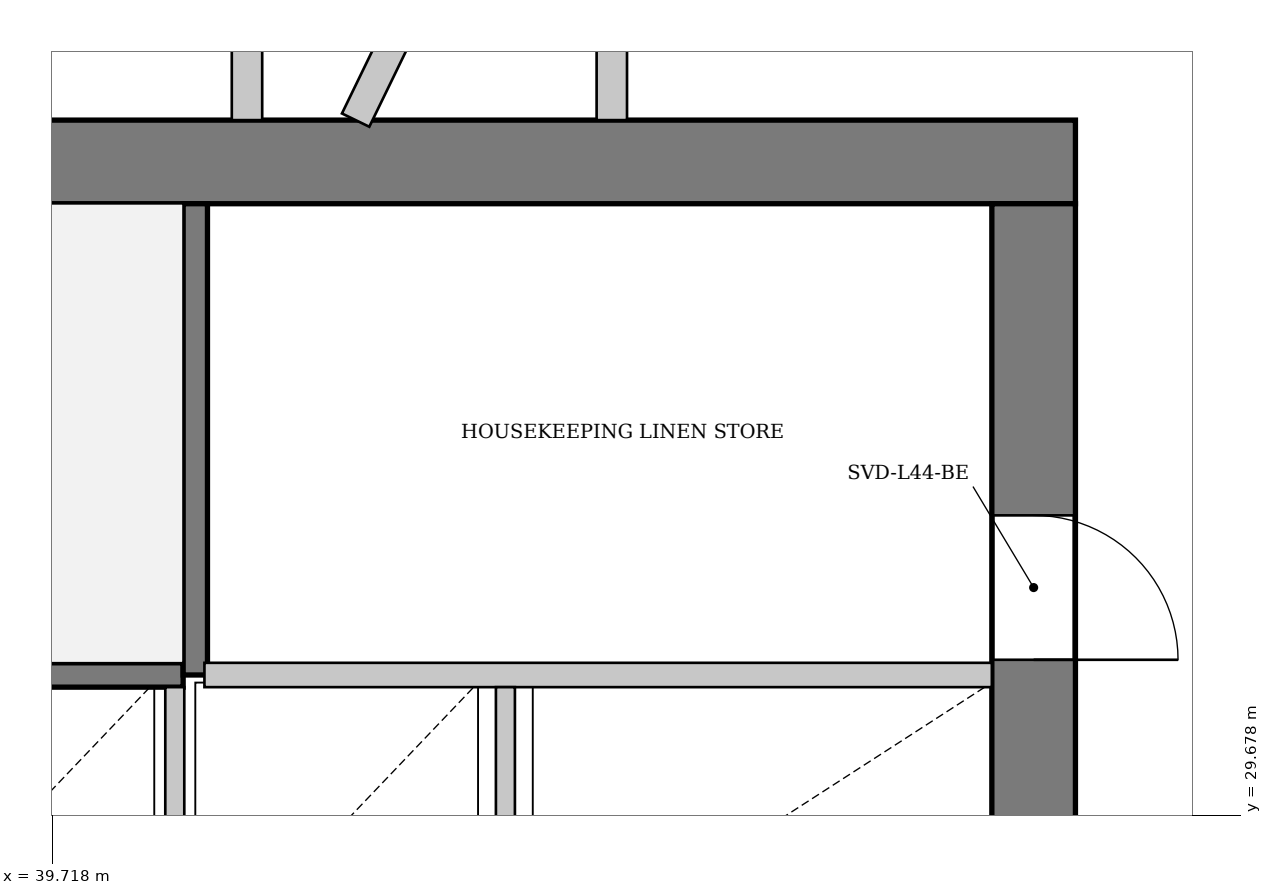
"""IFC4 building model, lengths in metres.
Left out: names, types, materials, properties, quantities, classifications, styles, units other than length and angle.
Written with IfcOpenShell. Run it as: python <this file> out.ifc"""

import sys

from ifc_helpers import new_model, si_unit, direction, frame, frame_2d, origin, place, context, subcontext, project, spatial, rectangle, extrude, source, transform, mapped, element, fill, save


model = new_model("IFC4")
c1 = context("Model", 3, precision=1e-05, world=origin(), true_north=direction((0.0, 1.0)))
c2 = subcontext(c1, "Body", "Model", "MODEL_VIEW")
j1 = project(units=[si_unit("LENGTHUNIT", "METRE"), si_unit("PLANEANGLEUNIT", "RADIAN")], contexts=[c1])
p1 = place(None, origin())
s1 = spatial("IfcSite", under=j1, at=p1, CompositionType="ELEMENT")
p2 = place(p1, origin())
s2 = spatial("IfcBuilding", under=s1, at=p2, CompositionType="ELEMENT")
p3 = place(p2, frame((0.0, 0.0, 167.9)))
s3 = spatial("IfcBuildingStorey", under=s2, at=p3, CompositionType="ELEMENT", Elevation=167.9)
p4 = place(p3, frame((29.55, 33.975, 0.0), z_axis=(0.0, 0.0, 1.0), x_axis=(1.0, 0.0, 0.0)))
e1 = element("IfcWall", 1, at=p4, inside=s3, PredefinedType="SHEAR", context=c2, shape_type="SweptSolid", body=[
    extrude(rectangle(XDim=16.9, YDim=0.55, at=frame_2d((8.45, 0.0))), origin(), (0.0, 0.0, 1.0), 3.33),
])
p5 = place(p4, frame((1.55, 0.0, 0.0)))
e2 = element("IfcOpeningElement", 2, at=p5, cuts=e1, PredefinedType="OPENING", context=c2, shape_type="SweptSolid", body=[
    extrude(rectangle(XDim=0.95, YDim=2.1, at=frame_2d((0.475, 1.05))), frame((0.0, 0.285, 0.0), z_axis=(0.0, -1.0, 0.0), x_axis=(1.0, 0.0, 0.0)), (0.0, 0.0, 1.0), 0.57),
])
p6 = place(p4, frame((3.93, 0.0, 0.0)))
e3 = element("IfcOpeningElement", 3, at=p6, cuts=e1, PredefinedType="OPENING", context=c2, shape_type="SweptSolid", body=[
    extrude(rectangle(XDim=1.32, YDim=2.2, at=frame_2d((0.66, 1.1))), frame((0.0, 0.285, 0.0), z_axis=(0.0, -1.0, 0.0), x_axis=(1.0, 0.0, 0.0)), (0.0, 0.0, 1.0), 0.57),
])
p7 = place(p3, frame((46.175, 33.7, 0.0), z_axis=(0.0, 0.0, 1.0), x_axis=(0.0, -1.0, 0.0)))
e4 = element("IfcWall", 4, at=p7, inside=s3, PredefinedType="SHEAR", context=c2, shape_type="SweptSolid", body=[
    extrude(rectangle(XDim=14.2, YDim=0.55, at=frame_2d((7.1, 0.0))), origin(), (0.0, 0.0, 1.0), 3.33),
])
p8 = place(p7, frame((5.18, 0.0, 0.0)))
e5 = element("IfcOpeningElement", 5, at=p8, cuts=e4, PredefinedType="OPENING", context=c2, shape_type="SweptSolid", body=[
    extrude(rectangle(XDim=1.6, YDim=2.2, at=frame_2d((0.8, 1.1))), frame((0.0, 0.285, 0.0), z_axis=(0.0, -1.0, 0.0), x_axis=(1.0, 0.0, 0.0)), (0.0, 0.0, 1.0), 0.57),
])
p9 = place(p7, frame((2.05, 0.0, 0.0)))
e6 = element("IfcOpeningElement", 6, at=p9, cuts=e4, PredefinedType="OPENING", context=c2, shape_type="SweptSolid", body=[
    extrude(rectangle(XDim=0.95, YDim=2.1, at=frame_2d((0.475, 1.05))), frame((0.0, 0.285, 0.0), z_axis=(0.0, -1.0, 0.0), x_axis=(1.0, 0.0, 0.0)), (0.0, 0.0, 1.0), 0.57),
])
p10 = place(p3, frame((33.28, 30.6, 0.0), z_axis=(0.0, 0.0, 1.0), x_axis=(1.0, 0.0, 0.0)))
e7 = element("IfcWall", 7, at=p10, inside=s3, PredefinedType="PARTITIONING", context=c2, shape_type="SweptSolid", body=[
    extrude(rectangle(XDim=7.3, YDim=0.16, at=frame_2d((3.65, 0.0))), origin(), (0.0, 0.0, 1.0), 3.33),
])
p11 = place(p3, frame((40.66, 30.6, 0.0), z_axis=(0.0, 0.0, 1.0), x_axis=(0.0, 1.0, 0.0)))
e8 = element("IfcWall", 8, at=p11, inside=s3, PredefinedType="PARTITIONING", context=c2, shape_type="SweptSolid", body=[
    extrude(rectangle(XDim=3.1, YDim=0.16, at=frame_2d((1.55, 0.0))), origin(), (0.0, 0.0, 1.0), 3.33),
])
p12 = place(p3, frame((40.72, 30.6, 0.0), z_axis=(0.0, 0.0, 1.0), x_axis=(1.0, 0.0, 0.0)))
e9 = element("IfcWall", 9, at=p12, inside=s3, PredefinedType="PARTITIONING", context=c2, shape_type="SweptSolid", body=[
    extrude(rectangle(XDim=5.18, YDim=0.16, at=frame_2d((2.59, 0.0))), origin(), (0.0, 0.0, 1.0), 3.33),
])
for number, where, z_axis, x_axis in (
    (10, (40.525, 28.6, 0.0), (0.0, 0.0, 1.0), (0.0, 1.0, 0.0)),
    (11, (42.7, 28.6, 0.0), (0.0, 0.0, 1.0), (0.0, 1.0, 0.0)),
):
    element("IfcWall", number, at=place(p3, frame(where, z_axis=z_axis, x_axis=x_axis)), inside=s3, PredefinedType="PARTITIONING", context=c2, shape_type="SweptSolid", body=[
        extrude(rectangle(XDim=1.92, YDim=0.125, at=frame_2d((0.96, 0.0))), origin(), (0.0, 0.0, 1.0), 3.33),
    ])
p13 = place(p3, frame((41.715, 34.25, 0.0), z_axis=(0.0, 0.0, 1.0), x_axis=(0.436811995944, 0.899552822351, 0.0)))
e12 = element("IfcWall", 12, at=p13, inside=s3, PredefinedType="PARTITIONING", context=c2, shape_type="SweptSolid", body=[
    extrude(rectangle(XDim=10.31, YDim=0.2, at=frame_2d((5.155, 0.0))), origin(), (0.0, 0.0, 1.0), 3.33),
])
for number, where, z_axis, x_axis in (
    (13, (41.0, 34.25, 0.0), (0.0, 0.0, 1.0), (0.0, 1.0, 0.0)),
    (14, (43.4, 34.25, 0.0), (0.0, 0.0, 1.0), (0.0, 1.0, 0.0)),
):
    element("IfcWall", number, at=place(p3, frame(where, z_axis=z_axis, x_axis=x_axis)), inside=s3, PredefinedType="PARTITIONING", context=c2, shape_type="SweptSolid", body=[
        extrude(rectangle(XDim=1.95, YDim=0.2, at=frame_2d((0.975, 0.0))), origin(), (0.0, 0.0, 1.0), 3.33),
    ])
m1 = source(origin(), c2, "Body", "SweptSolid", [
    extrude(rectangle(XDim=0.95, YDim=2.1, at=frame_2d((0.475, 1.05))), frame((0.0, 0.025, 0.0), z_axis=(0.0, -1.0, 0.0), x_axis=(1.0, 0.0, 0.0)), (0.0, 0.0, 1.0), 0.05),
])
p14 = place(p9, origin())
e15 = element("IfcDoor", 15, at=p14, inside=s3, OperationType="SINGLE_SWING_RIGHT", PredefinedType="DOOR", context=c2, shape_type="MappedRepresentation", body=[
    mapped(m1, transform((0.0, 0.0, 0.0), x_axis=(1.0, 0.0, 0.0), y_axis=(0.0, 1.0, 0.0), z_axis=(0.0, 0.0, 1.0), scale=1.0)),
])
fill(e6, e15)
save(model, sys.argv[1])
